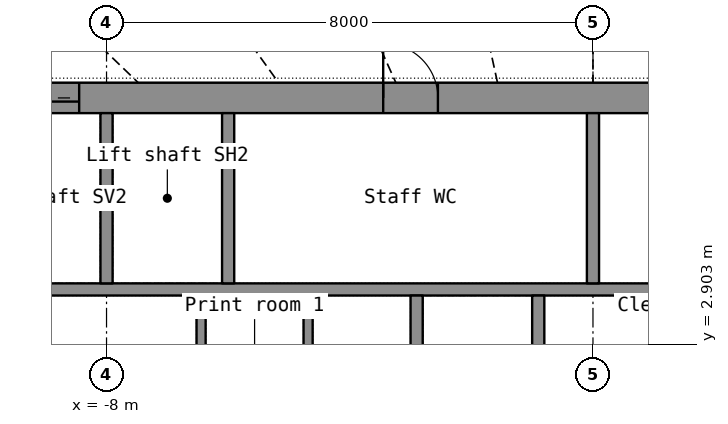
"""IFC4 building model, lengths in metres.
Left out: names, types, materials, properties, quantities, classifications, styles, units other than length and angle.
Written with IfcOpenShell. Run it as: python <this file> out.ifc"""

import sys

from ifc_helpers import new_model, si_unit, direction, frame, frame_2d, origin, place, context, subcontext, project, spatial, rectangle, extrude, element, fill, save


model = new_model("IFC4")
c1 = context("Model", 3, precision=1e-05, world=origin(), true_north=direction((0.0, 1.0)))
c2 = subcontext(c1, "Body", "Model", "MODEL_VIEW")
j1 = project(units=[si_unit("LENGTHUNIT", "METRE"), si_unit("PLANEANGLEUNIT", "RADIAN")], contexts=[c1])
p1 = place(None, origin())
s1 = spatial("IfcSite", under=j1, at=p1, CompositionType="ELEMENT")
p2 = place(p1, origin())
s2 = spatial("IfcBuilding", under=s1, at=p2, CompositionType="ELEMENT")
p3 = place(p2, frame((0.0, 0.0, 100.8)))
s3 = spatial("IfcBuildingStorey", under=s2, at=p3, CompositionType="ELEMENT", Elevation=100.8)
p4 = place(p3, frame((-11.5, 6.95, 0.0), z_axis=(0.0, 0.0, 1.0), x_axis=(1.0, 0.0, 0.0)))
e1 = element("IfcWall", 1, at=p4, inside=s3, PredefinedType="SHEAR", context=c2, shape_type="SweptSolid", body=[
    extrude(rectangle(XDim=23.0, YDim=0.5, at=frame_2d((11.5, 0.0))), origin(), (0.0, 0.0, 1.0), 3.3),
])
p5 = place(p4, frame((1.95, 0.0, 0.0)))
e2 = element("IfcOpeningElement", 2, at=p5, cuts=e1, PredefinedType="OPENING", context=c2, shape_type="SweptSolid", body=[
    extrude(rectangle(XDim=1.1, YDim=2.2, at=frame_2d((0.55, 1.1))), frame((0.0, 0.26, 0.0), z_axis=(0.0, -1.0, 0.0), x_axis=(1.0, 0.0, 0.0)), (0.0, 0.0, 1.0), 0.52),
])
p6 = place(p4, frame((8.05, 0.0, 0.0)))
e3 = element("IfcOpeningElement", 3, at=p6, cuts=e1, PredefinedType="OPENING", context=c2, shape_type="SweptSolid", body=[
    extrude(rectangle(XDim=0.9, YDim=2.1, at=frame_2d((0.45, 1.05))), frame((0.0, 0.26, 0.0), z_axis=(0.0, -1.0, 0.0), x_axis=(1.0, 0.0, 0.0)), (0.0, 0.0, 1.0), 0.52),
])
p7 = place(p4, frame((16.05, 0.0, 0.0)))
e4 = element("IfcOpeningElement", 4, at=p7, cuts=e1, PredefinedType="OPENING", context=c2, shape_type="SweptSolid", body=[
    extrude(rectangle(XDim=0.9, YDim=2.1, at=frame_2d((0.45, 1.05))), frame((0.0, 0.26, 0.0), z_axis=(0.0, -1.0, 0.0), x_axis=(1.0, 0.0, 0.0)), (0.0, 0.0, 1.0), 0.52),
])
p8 = place(p4, frame((0.3, 0.0, 0.0)))
e5 = element("IfcOpeningElement", 5, at=p8, cuts=e1, PredefinedType="OPENING", context=c2, shape_type="SweptSolid", body=[
    extrude(rectangle(XDim=0.8, YDim=2.05, at=frame_2d((0.4, 1.025))), frame((0.0, 0.26, 0.0), z_axis=(0.0, -1.0, 0.0), x_axis=(1.0, 0.0, 0.0)), (0.0, 0.0, 1.0), 0.52),
])
p9 = place(p4, frame((21.9, 0.0, 0.0)))
e6 = element("IfcOpeningElement", 6, at=p9, cuts=e1, PredefinedType="OPENING", context=c2, shape_type="SweptSolid", body=[
    extrude(rectangle(XDim=0.8, YDim=2.05, at=frame_2d((0.4, 1.025))), frame((0.0, 0.26, 0.0), z_axis=(0.0, -1.0, 0.0), x_axis=(1.0, 0.0, 0.0)), (0.0, 0.0, 1.0), 0.52),
])
p10 = place(p3, frame((-11.5, 3.8, 0.0), z_axis=(0.0, 0.0, 1.0), x_axis=(1.0, 0.0, 0.0)))
e7 = element("IfcWall", 7, at=p10, inside=s3, PredefinedType="SHEAR", context=c2, shape_type="SweptSolid", body=[
    extrude(rectangle(XDim=23.0, YDim=0.2, at=frame_2d((11.5, 0.0))), origin(), (0.0, 0.0, 1.0), 3.3),
])
for number, where, z_axis, x_axis in (
    (8, (-8.0, 3.9, 0.0), (0.0, 0.0, 1.0), (0.0, 1.0, 0.0)),
    (9, (-6.0, 3.9, 0.0), (0.0, 0.0, 1.0), (0.0, 1.0, 0.0)),
):
    element("IfcWall", number, at=place(p3, frame(where, z_axis=z_axis, x_axis=x_axis)), inside=s3, PredefinedType="SHEAR", context=c2, shape_type="SweptSolid", body=[
        extrude(rectangle(XDim=2.8, YDim=0.2, at=frame_2d((1.4, 0.0))), origin(), (0.0, 0.0, 1.0), 3.3),
    ])
p11 = place(p3, frame((0.0, 3.9, 0.0), z_axis=(0.0, 0.0, 1.0), x_axis=(0.0, 1.0, 0.0)))
e10 = element("IfcWall", 10, at=p11, inside=s3, PredefinedType="PARTITIONING", context=c2, shape_type="SweptSolid", body=[
    extrude(rectangle(XDim=2.8, YDim=0.2, at=frame_2d((1.4, 0.0))), origin(), (0.0, 0.0, 1.0), 3.3),
])
p12 = place(p3, frame((-2.9, -3.7, 0.0), z_axis=(0.0, 0.0, 1.0), x_axis=(0.0, 1.0, 0.0)))
e11 = element("IfcWall", 11, at=p12, inside=s3, PredefinedType="SHEAR", context=c2, shape_type="SweptSolid", body=[
    extrude(rectangle(XDim=7.4, YDim=0.2, at=frame_2d((3.7, 0.0))), origin(), (0.0, 0.0, 1.0), 3.3),
])
p13 = place(p12, frame((3.1, 0.0, 0.0)))
e12 = element("IfcOpeningElement", 12, at=p13, cuts=e11, PredefinedType="OPENING", context=c2, shape_type="SweptSolid", body=[
    extrude(rectangle(XDim=1.2, YDim=2.2, at=frame_2d((0.6, 1.1))), frame((0.0, 0.11, 0.0), z_axis=(0.0, -1.0, 0.0), x_axis=(1.0, 0.0, 0.0)), (0.0, 0.0, 1.0), 0.22),
])
p14 = place(p3, frame((-0.9, 1.35, 0.0), z_axis=(0.0, 0.0, 1.0), x_axis=(0.0, 1.0, 0.0)))
e13 = element("IfcWall", 13, at=p14, inside=s3, PredefinedType="SHEAR", context=c2, shape_type="SweptSolid", body=[
    extrude(rectangle(XDim=2.35, YDim=0.2, at=frame_2d((1.175, 0.0))), origin(), (0.0, 0.0, 1.0), 3.3),
])
for number, where, z_axis, x_axis in (
    (14, (-6.445, 1.35, 0.0), (0.0, 0.0, 1.0), (0.0, 1.0, 0.0)),
    (15, (-4.685, 1.35, 0.0), (0.0, 0.0, 1.0), (0.0, 1.0, 0.0)),
):
    element("IfcWall", number, at=place(p3, frame(where, z_axis=z_axis, x_axis=x_axis)), inside=s3, PredefinedType="PARTITIONING", context=c2, shape_type="SweptSolid", body=[
        extrude(rectangle(XDim=2.35, YDim=0.15, at=frame_2d((1.175, 0.0))), origin(), (0.0, 0.0, 1.0), 3.3),
    ])
p15 = place(p5, origin())
e16 = element("IfcDoor", 16, at=p15, inside=s3, OperationType="DOUBLE_DOOR_SLIDING", PredefinedType="DOOR", context=c2, shape_type="SweptSolid", body=[
    extrude(rectangle(XDim=1.1, YDim=2.2, at=frame_2d((0.55, 1.1))), frame((0.0, 0.025, 0.0), z_axis=(0.0, -1.0, 0.0), x_axis=(1.0, 0.0, 0.0)), (0.0, 0.0, 1.0), 0.05),
])
fill(e2, e16)
p16 = place(p6, origin())
e17 = element("IfcDoor", 17, at=p16, inside=s3, OperationType="SINGLE_SWING_LEFT", PredefinedType="DOOR", context=c2, shape_type="SweptSolid", body=[
    extrude(rectangle(XDim=0.9, YDim=2.1, at=frame_2d((0.45, 1.05))), frame((0.0, 0.025, 0.0), z_axis=(0.0, -1.0, 0.0), x_axis=(1.0, 0.0, 0.0)), (0.0, 0.0, 1.0), 0.05),
])
fill(e3, e17)
save(model, sys.argv[1])
